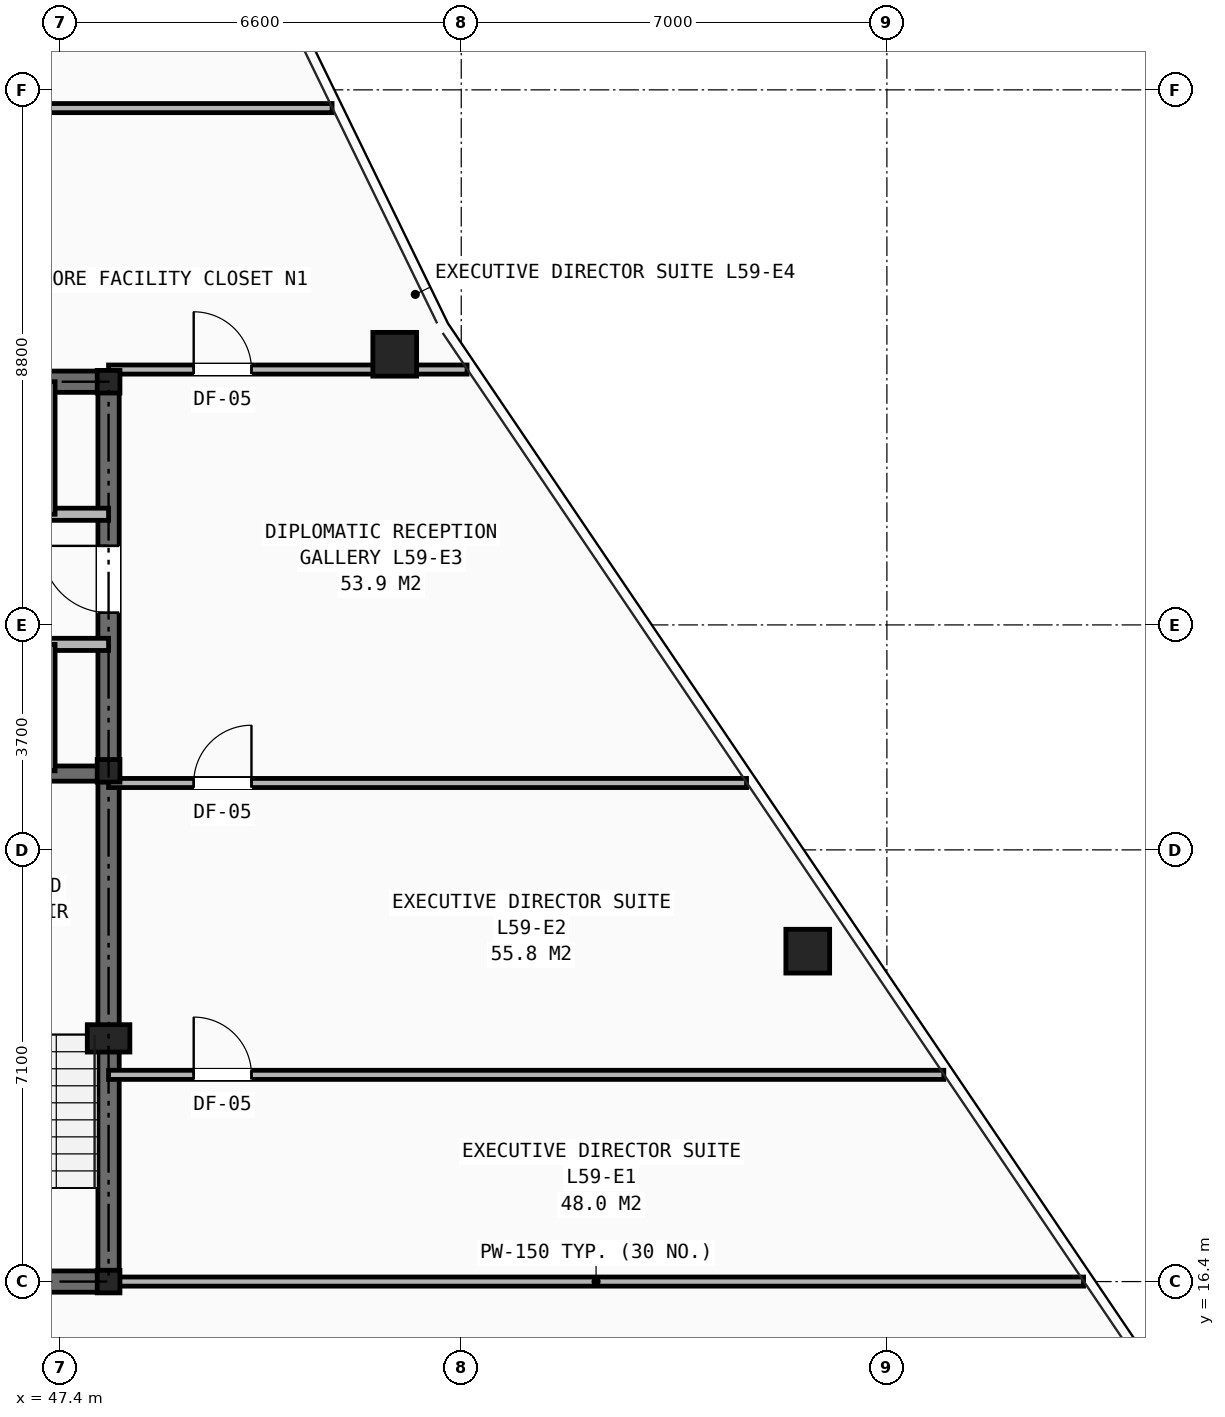
"""IFC4 building model, lengths in metres.
Left out: names, types, materials, properties, quantities, classifications, styles, units other than length and angle.
Written with IfcOpenShell. Run it as: python <this file> out.ifc"""

import sys

from ifc_helpers import new_model, si_unit, direction, frame, frame_2d, origin, origin_2d, place, context, subcontext, project, spatial, rectangle, hollow_rectangle, i_section, extrude, element, fill, save


model = new_model("IFC4")
c1 = context("Model", 3, precision=1e-05, world=origin(), true_north=direction((0.0, 1.0)))
c2 = subcontext(c1, "Body", "Model", "MODEL_VIEW")
j1 = project(units=[si_unit("LENGTHUNIT", "METRE"), si_unit("PLANEANGLEUNIT", "RADIAN")], contexts=[c1])
p1 = place(None, origin())
s1 = spatial("IfcSite", under=j1, at=p1, CompositionType="ELEMENT")
p2 = place(p1, origin())
s2 = spatial("IfcBuilding", under=s1, at=p2, CompositionType="ELEMENT")
p3 = place(p2, frame((0.0, 0.0, 208.4)))
s3 = spatial("IfcBuildingStorey", under=s2, at=p3, CompositionType="ELEMENT", Elevation=208.4)
for number, where, z_axis, x_axis in (
    (1, (48.2, 16.4, 0.0), (0.0, 0.0, 1.0), (1.0, 0.0, 0.0)),
    (2, (48.2, 24.8, 0.0), (0.0, 0.0, 1.0), (1.0, 0.0, 0.0)),
    (3, (48.2, 31.2, 0.0), (0.0, 0.0, 1.0), (1.0, 0.0, 0.0)),
):
    element("IfcColumn", number, at=place(p3, frame(where, z_axis=z_axis, x_axis=x_axis)), inside=s3, PredefinedType="COLUMN", context=c2, shape_type="SweptSolid", body=[
        extrude(i_section(OverallWidth=0.374, OverallDepth=0.372, WebThickness=0.016, FlangeThickness=0.026, at=origin_2d()), origin(), (0.0, 0.0, 1.0), 3.5),
    ])
p4 = place(p3, frame((48.2, 20.4, 0.0), z_axis=(0.0, 0.0, 1.0), x_axis=(1.0, 0.0, 0.0)))
e4 = element("IfcColumn", 4, at=p4, inside=s3, PredefinedType="PILASTER", context=c2, shape_type="SweptSolid", body=[
    extrude(rectangle(XDim=0.7, YDim=0.45, at=origin_2d()), origin(), (0.0, 0.0, 1.0), 3.5),
])
for number, where, z_axis, x_axis in (
    (5, (59.698, 21.834, 0.0), (0.0, 0.0, 1.0), (1.0, 0.0, 0.0)),
    (6, (52.906, 31.652, 0.0), (0.0, 0.0, 1.0), (1.0, 0.0, 0.0)),
):
    element("IfcColumn", number, at=place(p3, frame(where, z_axis=z_axis, x_axis=x_axis)), inside=s3, PredefinedType="COLUMN", context=c2, shape_type="SweptSolid", body=[
        extrude(hollow_rectangle(XDim=0.72, YDim=0.72, WallThickness=0.05, at=origin_2d()), origin(), (0.0, 0.0, 1.0), 3.5),
    ])
p5 = place(p3, frame((31.8, 16.4, 0.0), z_axis=(0.0, 0.0, 1.0), x_axis=(1.0, 0.0, 0.0)))
e7 = element("IfcWall", 7, at=p5, inside=s3, PredefinedType="SHEAR", context=c2, shape_type="SweptSolid", body=[
    extrude(rectangle(XDim=16.4, YDim=0.35, at=frame_2d((8.2, 0.0))), origin(), (0.0, 0.0, 1.0), 3.25),
])
p6 = place(p5, frame((7.75, 0.0, 0.0)))
e8 = element("IfcOpeningElement", 8, at=p6, cuts=e7, PredefinedType="OPENING", context=c2, shape_type="SweptSolid", body=[
    extrude(rectangle(XDim=0.9, YDim=2.1, at=frame_2d((0.45, 1.05))), frame((0.0, 0.185, 0.0), z_axis=(0.0, -1.0, 0.0), x_axis=(1.0, 0.0, 0.0)), (0.0, 0.0, 1.0), 0.37),
])
p7 = place(p5, frame((4.2, 0.0, 0.0)))
e9 = element("IfcOpeningElement", 9, at=p7, cuts=e7, PredefinedType="OPENING", context=c2, shape_type="SweptSolid", body=[
    extrude(rectangle(XDim=0.95, YDim=2.1, at=frame_2d((0.475, 1.05))), frame((0.0, 0.185, 0.0), z_axis=(0.0, -1.0, 0.0), x_axis=(1.0, 0.0, 0.0)), (0.0, 0.0, 1.0), 0.37),
])
p8 = place(p5, frame((10.6, 0.0, 0.0)))
e10 = element("IfcOpeningElement", 10, at=p8, cuts=e7, PredefinedType="OPENING", context=c2, shape_type="SweptSolid", body=[
    extrude(rectangle(XDim=0.95, YDim=2.1, at=frame_2d((0.475, 1.05))), frame((0.0, 0.185, 0.0), z_axis=(0.0, -1.0, 0.0), x_axis=(1.0, 0.0, 0.0)), (0.0, 0.0, 1.0), 0.37),
])
p9 = place(p3, frame((31.8, 31.2, 0.0), z_axis=(0.0, 0.0, 1.0), x_axis=(1.0, 0.0, 0.0)))
e11 = element("IfcWall", 11, at=p9, inside=s3, PredefinedType="SHEAR", context=c2, shape_type="SweptSolid", body=[
    extrude(rectangle(XDim=16.4, YDim=0.35, at=frame_2d((8.2, 0.0))), origin(), (0.0, 0.0, 1.0), 3.25),
])
p10 = place(p3, frame((48.2, 16.4, 0.0), z_axis=(0.0, 0.0, 1.0), x_axis=(0.0, 1.0, 0.0)))
e12 = element("IfcWall", 12, at=p10, inside=s3, PredefinedType="SHEAR", context=c2, shape_type="SweptSolid", body=[
    extrude(rectangle(XDim=14.8, YDim=0.35, at=frame_2d((7.4, 0.0))), origin(), (0.0, 0.0, 1.0), 3.25),
])
p11 = place(p10, frame((11.0, 0.0, 0.0)))
e13 = element("IfcOpeningElement", 13, at=p11, cuts=e12, PredefinedType="OPENING", context=c2, shape_type="SweptSolid", body=[
    extrude(rectangle(XDim=1.1, YDim=2.15, at=frame_2d((0.55, 1.075))), frame((0.0, 0.185, 0.0), z_axis=(0.0, -1.0, 0.0), x_axis=(1.0, 0.0, 0.0)), (0.0, 0.0, 1.0), 0.37),
])
p12 = place(p3, frame((44.955, 24.755, 0.0), z_axis=(0.0, 0.0, 1.0), x_axis=(1.0, 0.0, 0.0)))
e14 = element("IfcWall", 14, at=p12, inside=s3, PredefinedType="SHEAR", context=c2, shape_type="SweptSolid", body=[
    extrude(rectangle(XDim=3.245, YDim=0.25, at=frame_2d((1.623, 0.0))), origin(), (0.0, 0.0, 1.0), 3.25),
])
p13 = place(p3, frame((33.82, 29.02, 0.0), z_axis=(0.0, 0.0, 1.0), x_axis=(1.0, 0.0, 0.0)))
e15 = element("IfcWall", 15, at=p13, inside=s3, PredefinedType="SOLIDWALL", context=c2, shape_type="SweptSolid", body=[
    extrude(rectangle(XDim=14.38, YDim=0.2, at=frame_2d((7.19, 0.0))), origin(), (0.0, 0.0, 1.0), 2.705),
])
p14 = place(p13, frame((1.78, 0.0, 0.0)))
e16 = element("IfcOpeningElement", 16, at=p14, cuts=e15, PredefinedType="OPENING", context=c2, shape_type="SweptSolid", body=[
    extrude(rectangle(XDim=0.9, YDim=2.1, at=frame_2d((0.45, 1.05))), frame((0.0, 0.11, 0.0), z_axis=(0.0, -1.0, 0.0), x_axis=(1.0, 0.0, 0.0)), (0.0, 0.0, 1.0), 0.22),
])
p15 = place(p13, frame((6.07, 0.0, 0.0)))
e17 = element("IfcOpeningElement", 17, at=p15, cuts=e15, PredefinedType="OPENING", context=c2, shape_type="SweptSolid", body=[
    extrude(rectangle(XDim=0.9, YDim=2.1, at=frame_2d((0.45, 1.05))), frame((0.0, 0.11, 0.0), z_axis=(0.0, -1.0, 0.0), x_axis=(1.0, 0.0, 0.0)), (0.0, 0.0, 1.0), 0.22),
])
p16 = place(p13, frame((9.39, 0.0, 0.0)))
e18 = element("IfcOpeningElement", 18, at=p16, cuts=e15, PredefinedType="OPENING", context=c2, shape_type="SweptSolid", body=[
    extrude(rectangle(XDim=1.1, YDim=2.15, at=frame_2d((0.55, 1.075))), frame((0.0, 0.11, 0.0), z_axis=(0.0, -1.0, 0.0), x_axis=(1.0, 0.0, 0.0)), (0.0, 0.0, 1.0), 0.22),
])
p17 = place(p13, frame((11.71, 0.0, 0.0)))
e19 = element("IfcOpeningElement", 19, at=p17, cuts=e15, PredefinedType="OPENING", context=c2, shape_type="SweptSolid", body=[
    extrude(rectangle(XDim=1.1, YDim=2.15, at=frame_2d((0.55, 1.075))), frame((0.0, 0.11, 0.0), z_axis=(0.0, -1.0, 0.0), x_axis=(1.0, 0.0, 0.0)), (0.0, 0.0, 1.0), 0.22),
])
p18 = place(p3, frame((31.8, 26.88, 0.0), z_axis=(0.0, 0.0, 1.0), x_axis=(1.0, 0.0, 0.0)))
e20 = element("IfcWall", 20, at=p18, inside=s3, PredefinedType="SOLIDWALL", context=c2, shape_type="SweptSolid", body=[
    extrude(rectangle(XDim=16.4, YDim=0.2, at=frame_2d((8.2, 0.0))), origin(), (0.0, 0.0, 1.0), 2.705),
])
p19 = place(p18, frame((0.55, 0.0, 0.0)))
e21 = element("IfcOpeningElement", 21, at=p19, cuts=e20, PredefinedType="OPENING", context=c2, shape_type="SweptSolid", body=[
    extrude(rectangle(XDim=0.85, YDim=2.05, at=frame_2d((0.425, 1.025))), frame((0.0, 0.11, 0.0), z_axis=(0.0, -1.0, 0.0), x_axis=(1.0, 0.0, 0.0)), (0.0, 0.0, 1.0), 0.22),
])
p20 = place(p18, frame((5.94, 0.0, 0.0)))
e22 = element("IfcOpeningElement", 22, at=p20, cuts=e20, PredefinedType="OPENING", context=c2, shape_type="SweptSolid", body=[
    extrude(rectangle(XDim=0.9, YDim=2.1, at=frame_2d((0.45, 1.05))), frame((0.0, 0.11, 0.0), z_axis=(0.0, -1.0, 0.0), x_axis=(1.0, 0.0, 0.0)), (0.0, 0.0, 1.0), 0.22),
])
p21 = place(p18, frame((11.41, 0.0, 0.0)))
e23 = element("IfcOpeningElement", 23, at=p21, cuts=e20, PredefinedType="OPENING", context=c2, shape_type="SweptSolid", body=[
    extrude(rectangle(XDim=1.1, YDim=2.15, at=frame_2d((0.55, 1.075))), frame((0.0, 0.11, 0.0), z_axis=(0.0, -1.0, 0.0), x_axis=(1.0, 0.0, 0.0)), (0.0, 0.0, 1.0), 0.22),
])
p22 = place(p18, frame((13.73, 0.0, 0.0)))
e24 = element("IfcOpeningElement", 24, at=p22, cuts=e20, PredefinedType="OPENING", context=c2, shape_type="SweptSolid", body=[
    extrude(rectangle(XDim=1.1, YDim=2.15, at=frame_2d((0.55, 1.075))), frame((0.0, 0.11, 0.0), z_axis=(0.0, -1.0, 0.0), x_axis=(1.0, 0.0, 0.0)), (0.0, 0.0, 1.0), 0.22),
])
p23 = place(p3, frame((47.24, 29.02, 0.0), z_axis=(0.0, 0.0, 1.0), x_axis=(0.0, 1.0, 0.0)))
e25 = element("IfcWall", 25, at=p23, inside=s3, PredefinedType="SOLIDWALL", context=c2, shape_type="SweptSolid", body=[
    extrude(rectangle(XDim=2.18, YDim=0.16, at=frame_2d((1.09, 0.0))), origin(), (0.0, 0.0, 1.0), 2.705),
])
p24 = place(p3, frame((47.24, 24.8, 0.0), z_axis=(0.0, 0.0, 1.0), x_axis=(0.0, 1.0, 0.0)))
e26 = element("IfcWall", 26, at=p24, inside=s3, PredefinedType="SOLIDWALL", context=c2, shape_type="SweptSolid", body=[
    extrude(rectangle(XDim=2.08, YDim=0.16, at=frame_2d((1.04, 0.0))), origin(), (0.0, 0.0, 1.0), 3.25),
])
p25 = place(p3, frame((48.2, 16.4, 0.0), z_axis=(0.0, 0.0, 1.0), x_axis=(1.0, 0.0, 0.0)))
e27 = element("IfcWall", 27, at=p25, inside=s3, PredefinedType="PARTITIONING", context=c2, shape_type="SweptSolid", body=[
    extrude(rectangle(XDim=16.034, YDim=0.15, at=frame_2d((8.017, 0.0))), origin(), (0.0, 0.0, 1.0), 2.292),
])
p26 = place(p3, frame((46.8, 35.7, 0.0), z_axis=(0.0, 0.0, 1.0), x_axis=(1.0, 0.0, 0.0)))
e28 = element("IfcWall", 28, at=p26, inside=s3, PredefinedType="PARTITIONING", context=c2, shape_type="SweptSolid", body=[
    extrude(rectangle(XDim=5.076, YDim=0.15, at=frame_2d((2.538, 0.0))), origin(), (0.0, 0.0, 1.0), 2.628),
])
p27 = place(p3, frame((48.2, 19.8, 0.0), z_axis=(0.0, 0.0, 1.0), x_axis=(1.0, 0.0, 0.0)))
e29 = element("IfcWall", 29, at=p27, inside=s3, PredefinedType="PARTITIONING", context=c2, shape_type="SweptSolid", body=[
    extrude(rectangle(XDim=13.736, YDim=0.15, at=frame_2d((6.868, 0.0))), origin(), (0.0, 0.0, 1.0), 2.292),
])
p28 = place(p27, frame((1.4, 0.0, 0.0)))
e30 = element("IfcOpeningElement", 30, at=p28, cuts=e29, PredefinedType="OPENING", context=c2, shape_type="SweptSolid", body=[
    extrude(rectangle(XDim=0.95, YDim=2.1, at=frame_2d((0.475, 1.05))), frame((0.0, 0.085, 0.0), z_axis=(0.0, -1.0, 0.0), x_axis=(1.0, 0.0, 0.0)), (0.0, 0.0, 1.0), 0.17),
])
p29 = place(p3, frame((48.2, 24.6, 0.0), z_axis=(0.0, 0.0, 1.0), x_axis=(1.0, 0.0, 0.0)))
e31 = element("IfcWall", 31, at=p29, inside=s3, PredefinedType="PARTITIONING", context=c2, shape_type="SweptSolid", body=[
    extrude(rectangle(XDim=10.492, YDim=0.15, at=frame_2d((5.246, 0.0))), origin(), (0.0, 0.0, 1.0), 2.628),
])
p30 = place(p29, frame((1.4, 0.0, 0.0)))
e32 = element("IfcOpeningElement", 32, at=p30, cuts=e31, PredefinedType="OPENING", context=c2, shape_type="SweptSolid", body=[
    extrude(rectangle(XDim=0.95, YDim=2.1, at=frame_2d((0.475, 1.05))), frame((0.0, 0.085, 0.0), z_axis=(0.0, -1.0, 0.0), x_axis=(1.0, 0.0, 0.0)), (0.0, 0.0, 1.0), 0.17),
])
p31 = place(p3, frame((48.2, 31.4, 0.0), z_axis=(0.0, 0.0, 1.0), x_axis=(1.0, 0.0, 0.0)))
e33 = element("IfcWall", 33, at=p31, inside=s3, PredefinedType="PARTITIONING", context=c2, shape_type="SweptSolid", body=[
    extrude(rectangle(XDim=5.896, YDim=0.15, at=frame_2d((2.948, 0.0))), origin(), (0.0, 0.0, 1.0), 2.292),
])
p32 = place(p31, frame((1.4, 0.0, 0.0)))
e34 = element("IfcOpeningElement", 34, at=p32, cuts=e33, PredefinedType="OPENING", context=c2, shape_type="SweptSolid", body=[
    extrude(rectangle(XDim=0.95, YDim=2.1, at=frame_2d((0.475, 1.05))), frame((0.0, 0.085, 0.0), z_axis=(0.0, -1.0, 0.0), x_axis=(1.0, 0.0, 0.0)), (0.0, 0.0, 1.0), 0.17),
])
p33 = place(p11, origin())
e35 = element("IfcDoor", 35, at=p33, inside=s3, OperationType="SINGLE_SWING_RIGHT", PredefinedType="DOOR", context=c2, shape_type="SweptSolid", body=[
    extrude(rectangle(XDim=1.1, YDim=2.15, at=frame_2d((0.55, 1.075))), frame((0.0, 0.025, 0.0), z_axis=(0.0, -1.0, 0.0), x_axis=(1.0, 0.0, 0.0)), (0.0, 0.0, 1.0), 0.05),
])
fill(e13, e35)
p34 = place(p28, origin())
e36 = element("IfcDoor", 36, at=p34, inside=s3, OperationType="SINGLE_SWING_LEFT", PredefinedType="DOOR", context=c2, shape_type="SweptSolid", body=[
    extrude(rectangle(XDim=0.95, YDim=2.1, at=frame_2d((0.475, 1.05))), frame((0.0, 0.025, 0.0), z_axis=(0.0, -1.0, 0.0), x_axis=(1.0, 0.0, 0.0)), (0.0, 0.0, 1.0), 0.05),
])
fill(e30, e36)
p35 = place(p30, origin())
e37 = element("IfcDoor", 37, at=p35, inside=s3, OperationType="SINGLE_SWING_RIGHT", PredefinedType="DOOR", context=c2, shape_type="SweptSolid", body=[
    extrude(rectangle(XDim=0.95, YDim=2.1, at=frame_2d((0.475, 1.05))), frame((0.0, 0.025, 0.0), z_axis=(0.0, -1.0, 0.0), x_axis=(1.0, 0.0, 0.0)), (0.0, 0.0, 1.0), 0.05),
])
fill(e32, e37)
p36 = place(p32, origin())
e38 = element("IfcDoor", 38, at=p36, inside=s3, OperationType="SINGLE_SWING_LEFT", PredefinedType="DOOR", context=c2, shape_type="SweptSolid", body=[
    extrude(rectangle(XDim=0.95, YDim=2.1, at=frame_2d((0.475, 1.05))), frame((0.0, 0.025, 0.0), z_axis=(0.0, -1.0, 0.0), x_axis=(1.0, 0.0, 0.0)), (0.0, 0.0, 1.0), 0.05),
])
fill(e34, e38)
save(model, sys.argv[1])
